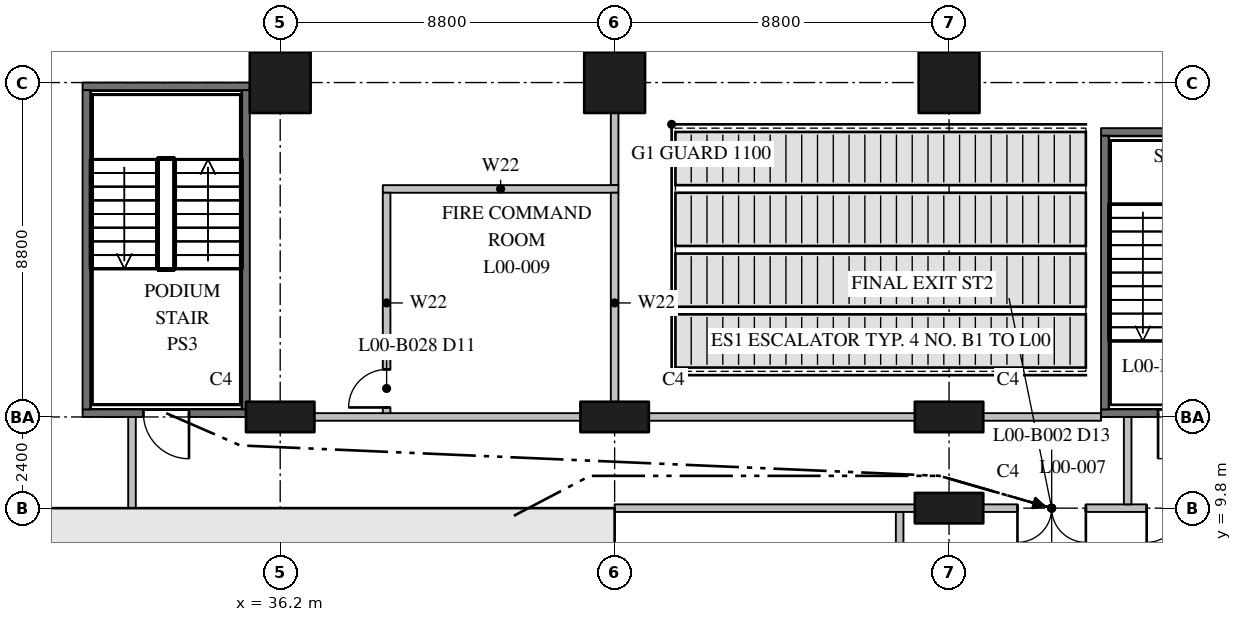
"""IFC4 building model, lengths in metres.
Left out: names, types, materials, properties, quantities, classifications, styles, units other than length and angle.
Written with IfcOpenShell. Run it as: python <this file> out.ifc"""

import sys

from ifc_helpers import new_model, si_unit, direction, frame, frame_2d, origin, origin_2d, place, context, subcontext, project, spatial, rectangle, extrude, element, fill, save


model = new_model("IFC4")
c1 = context("Model", 3, precision=1e-05, world=origin(), true_north=direction((0.0, 1.0)))
c2 = subcontext(c1, "Body", "Model", "MODEL_VIEW")
j1 = project(units=[si_unit("LENGTHUNIT", "METRE"), si_unit("PLANEANGLEUNIT", "RADIAN")], contexts=[c1])
p1 = place(None, origin())
s1 = spatial("IfcSite", under=j1, at=p1, CompositionType="ELEMENT")
p2 = place(p1, origin())
s2 = spatial("IfcBuilding", under=s1, at=p2, CompositionType="ELEMENT")
p3 = place(p2, origin())
s3 = spatial("IfcBuildingStorey", under=s2, at=p3, CompositionType="ELEMENT", Elevation=0.0)
p4 = place(p3, frame((36.2, 12.2, 0.0), z_axis=(0.0, 0.0, 1.0), x_axis=(1.0, 0.0, 0.0)))
e1 = element("IfcColumn", 1, at=p4, inside=s3, PredefinedType="COLUMN", context=c2, shape_type="SweptSolid", body=[
    extrude(rectangle(XDim=1.8, YDim=0.8, at=origin_2d()), origin(), (0.0, 0.0, 1.0), 7.5),
])
p5 = place(p3, frame((36.2, 21.0, 0.0), z_axis=(0.0, 0.0, 1.0), x_axis=(1.0, 0.0, 0.0)))
e2 = element("IfcColumn", 2, at=p5, inside=s3, PredefinedType="COLUMN", context=c2, shape_type="SweptSolid", body=[
    extrude(rectangle(XDim=1.6, YDim=1.6, at=origin_2d()), origin(), (0.0, 0.0, 1.0), 7.5),
])
p6 = place(p3, frame((45.0, 12.2, 0.0), z_axis=(0.0, 0.0, 1.0), x_axis=(1.0, 0.0, 0.0)))
e3 = element("IfcColumn", 3, at=p6, inside=s3, PredefinedType="COLUMN", context=c2, shape_type="SweptSolid", body=[
    extrude(rectangle(XDim=1.8, YDim=0.8, at=origin_2d()), origin(), (0.0, 0.0, 1.0), 7.5),
])
p7 = place(p3, frame((45.0, 21.0, 0.0), z_axis=(0.0, 0.0, 1.0), x_axis=(1.0, 0.0, 0.0)))
e4 = element("IfcColumn", 4, at=p7, inside=s3, PredefinedType="COLUMN", context=c2, shape_type="SweptSolid", body=[
    extrude(rectangle(XDim=1.6, YDim=1.6, at=origin_2d()), origin(), (0.0, 0.0, 1.0), 7.5),
])
for number, where, z_axis, x_axis in (
    (5, (53.8, 9.8, 0.0), (0.0, 0.0, 1.0), (1.0, 0.0, 0.0)),
    (6, (53.8, 12.2, 0.0), (0.0, 0.0, 1.0), (1.0, 0.0, 0.0)),
):
    element("IfcColumn", number, at=place(p3, frame(where, z_axis=z_axis, x_axis=x_axis)), inside=s3, PredefinedType="COLUMN", context=c2, shape_type="SweptSolid", body=[
        extrude(rectangle(XDim=1.8, YDim=0.8, at=origin_2d()), origin(), (0.0, 0.0, 1.0), 7.5),
    ])
p8 = place(p3, frame((53.8, 21.0, 0.0), z_axis=(0.0, 0.0, 1.0), x_axis=(1.0, 0.0, 0.0)))
e7 = element("IfcColumn", 7, at=p8, inside=s3, PredefinedType="COLUMN", context=c2, shape_type="SweptSolid", body=[
    extrude(rectangle(XDim=1.6, YDim=1.6, at=origin_2d()), origin(), (0.0, 0.0, 1.0), 7.5),
])
p9 = place(p3, frame((44.4, 1.2, 0.0), z_axis=(0.0, 0.0, 1.0), x_axis=(0.0, 1.0, 0.0)))
e8 = element("IfcWall", 8, at=p9, inside=s3, PredefinedType="SHEAR", context=c2, shape_type="SweptSolid", body=[
    extrude(rectangle(XDim=8.6, YDim=1.2, at=frame_2d((4.3, 0.0))), origin(), (0.0, 0.0, 1.0), 7.5),
])
p10 = place(p9, frame((5.4, 0.0, 0.0)))
e9 = element("IfcOpeningElement", 9, at=p10, cuts=e8, PredefinedType="OPENING", context=c2, shape_type="SweptSolid", body=[
    extrude(rectangle(XDim=1.2, YDim=2.1, at=frame_2d((0.6, 1.05))), frame((0.0, 0.61, 0.0), z_axis=(0.0, -1.0, 0.0), x_axis=(1.0, 0.0, 0.0)), (0.0, 0.0, 1.0), 1.22),
])
p11 = place(p3, frame((40.7, 9.6, 0.0), z_axis=(0.0, 0.0, 1.0), x_axis=(1.0, 0.0, 0.0)))
e10 = element("IfcWall", 10, at=p11, inside=s3, PredefinedType="SHEAR", context=c2, shape_type="SweptSolid", body=[
    extrude(rectangle(XDim=4.3, YDim=0.4, at=frame_2d((2.15, 0.0))), origin(), (0.0, 0.0, 1.0), 7.5),
])
p12 = place(p11, frame((1.05, 0.0, 0.0)))
e11 = element("IfcOpeningElement", 11, at=p12, cuts=e10, PredefinedType="OPENING", context=c2, shape_type="SweptSolid", body=[
    extrude(rectangle(XDim=1.2, YDim=2.1, at=frame_2d((0.6, 1.05))), frame((0.0, 0.21, 0.0), z_axis=(0.0, -1.0, 0.0), x_axis=(1.0, 0.0, 0.0)), (0.0, 0.0, 1.0), 0.42),
])
p13 = place(p3, frame((27.1, 9.6, 0.0), z_axis=(0.0, 0.0, 1.0), x_axis=(1.0, 0.0, 0.0)))
e12 = element("IfcWall", 12, at=p13, inside=s3, PredefinedType="SHEAR", context=c2, shape_type="SweptSolid", body=[
    extrude(rectangle(XDim=13.6, YDim=0.4, at=frame_2d((6.8, 0.0))), origin(), (0.0, 0.0, 1.0), 7.5),
])
p14 = place(p13, frame((0.85, 0.0, 0.0)))
e13 = element("IfcOpeningElement", 13, at=p14, cuts=e12, PredefinedType="OPENING", context=c2, shape_type="SweptSolid", body=[
    extrude(rectangle(XDim=0.9, YDim=2.1, at=frame_2d((0.45, 1.05))), frame((0.0, 0.21, 0.0), z_axis=(0.0, -1.0, 0.0), x_axis=(1.0, 0.0, 0.0)), (0.0, 0.0, 1.0), 0.42),
])
p15 = place(p13, frame((3.4, 0.0, 0.0)))
e14 = element("IfcOpeningElement", 14, at=p15, cuts=e12, PredefinedType="OPENING", context=c2, shape_type="SweptSolid", body=[
    extrude(rectangle(XDim=1.0, YDim=2.1, at=frame_2d((0.5, 1.05))), frame((0.0, 0.21, 0.0), z_axis=(0.0, -1.0, 0.0), x_axis=(1.0, 0.0, 0.0)), (0.0, 0.0, 1.0), 0.42),
])
p16 = place(p3, frame((40.7, 1.2, 0.0), z_axis=(0.0, 0.0, 1.0), x_axis=(0.0, 1.0, 0.0)))
e15 = element("IfcWall", 15, at=p16, inside=s3, PredefinedType="SHEAR", context=c2, shape_type="SweptSolid", body=[
    extrude(rectangle(XDim=8.4, YDim=0.4, at=frame_2d((4.2, 0.0))), origin(), (0.0, 0.0, 1.0), 7.5),
])
p17 = place(p16, frame((4.45, 0.0, 0.0)))
e16 = element("IfcOpeningElement", 16, at=p17, cuts=e15, PredefinedType="OPENING", context=c2, shape_type="SweptSolid", body=[
    extrude(rectangle(XDim=0.9, YDim=2.1, at=frame_2d((0.45, 1.05))), frame((0.0, 0.21, 0.0), z_axis=(0.0, -1.0, 0.0), x_axis=(1.0, 0.0, 0.0)), (0.0, 0.0, 1.0), 0.42),
])
p18 = place(p3, frame((37.5, 7.0, 0.0), z_axis=(0.0, 0.0, 1.0), x_axis=(0.0, 1.0, 0.0)))
e17 = element("IfcWall", 17, at=p18, inside=s3, PredefinedType="SHEAR", context=c2, shape_type="SweptSolid", body=[
    extrude(rectangle(XDim=2.4, YDim=0.25, at=frame_2d((1.2, 0.0))), origin(), (0.0, 0.0, 1.0), 7.5),
])
p19 = place(p3, frame((57.8, 12.3, 0.0), z_axis=(0.0, 0.0, 1.0), x_axis=(1.0, 0.0, 0.0)))
e18 = element("IfcWall", 18, at=p19, inside=s3, PredefinedType="SHEAR", context=c2, shape_type="SweptSolid", body=[
    extrude(rectangle(XDim=4.2, YDim=0.2, at=frame_2d((2.1, 0.0))), origin(), (0.0, 0.0, 1.0), 7.1),
])
p20 = place(p19, frame((1.5, 0.0, 0.0)))
e19 = element("IfcOpeningElement", 19, at=p20, cuts=e18, PredefinedType="OPENING", context=c2, shape_type="SweptSolid", body=[
    extrude(rectangle(XDim=1.2, YDim=2.1, at=frame_2d((0.6, 1.05))), frame((0.0, 0.11, 0.0), z_axis=(0.0, -1.0, 0.0), x_axis=(1.0, 0.0, 0.0)), (0.0, 0.0, 1.0), 0.22),
])
p21 = place(p3, frame((57.8, 19.7, 0.0), z_axis=(0.0, 0.0, 1.0), x_axis=(1.0, 0.0, 0.0)))
e20 = element("IfcWall", 20, at=p21, inside=s3, PredefinedType="SHEAR", context=c2, shape_type="SweptSolid", body=[
    extrude(rectangle(XDim=4.2, YDim=0.2, at=frame_2d((2.1, 0.0))), origin(), (0.0, 0.0, 1.0), 7.1),
])
p22 = place(p3, frame((57.9, 12.4, 0.0), z_axis=(0.0, 0.0, 1.0), x_axis=(0.0, 1.0, 0.0)))
e21 = element("IfcWall", 21, at=p22, inside=s3, PredefinedType="SHEAR", context=c2, shape_type="SweptSolid", body=[
    extrude(rectangle(XDim=7.2, YDim=0.2, at=frame_2d((3.6, 0.0))), origin(), (0.0, 0.0, 1.0), 7.1),
])
p23 = place(p3, frame((31.0, 12.3, 0.0), z_axis=(0.0, 0.0, 1.0), x_axis=(1.0, 0.0, 0.0)))
e22 = element("IfcWall", 22, at=p23, inside=s3, PredefinedType="SHEAR", context=c2, shape_type="SweptSolid", body=[
    extrude(rectangle(XDim=4.4, YDim=0.2, at=frame_2d((2.2, 0.0))), origin(), (0.0, 0.0, 1.0), 7.1),
])
p24 = place(p23, frame((1.6, 0.0, 0.0)))
e23 = element("IfcOpeningElement", 23, at=p24, cuts=e22, PredefinedType="OPENING", context=c2, shape_type="SweptSolid", body=[
    extrude(rectangle(XDim=1.2, YDim=2.1, at=frame_2d((0.6, 1.05))), frame((0.0, 0.11, 0.0), z_axis=(0.0, -1.0, 0.0), x_axis=(1.0, 0.0, 0.0)), (0.0, 0.0, 1.0), 0.22),
])
p25 = place(p3, frame((31.0, 20.9, 0.0), z_axis=(0.0, 0.0, 1.0), x_axis=(1.0, 0.0, 0.0)))
e24 = element("IfcWall", 24, at=p25, inside=s3, PredefinedType="SHEAR", context=c2, shape_type="SweptSolid", body=[
    extrude(rectangle(XDim=4.4, YDim=0.2, at=frame_2d((2.2, 0.0))), origin(), (0.0, 0.0, 1.0), 7.1),
])
for number, where, z_axis, x_axis in (
    (25, (31.1, 12.4, 0.0), (0.0, 0.0, 1.0), (0.0, 1.0, 0.0)),
    (26, (35.3, 12.4, 0.0), (0.0, 0.0, 1.0), (0.0, 1.0, 0.0)),
):
    element("IfcWall", number, at=place(p3, frame(where, z_axis=z_axis, x_axis=x_axis)), inside=s3, PredefinedType="SHEAR", context=c2, shape_type="SweptSolid", body=[
        extrude(rectangle(XDim=8.4, YDim=0.2, at=frame_2d((4.2, 0.0))), origin(), (0.0, 0.0, 1.0), 7.1),
    ])
p26 = place(p3, frame((45.0, 9.8, 0.0), z_axis=(0.0, 0.0, 1.0), x_axis=(1.0, 0.0, 0.0)))
e27 = element("IfcWall", 27, at=p26, inside=s3, PredefinedType="PARTITIONING", context=c2, shape_type="SweptSolid", body=[
    extrude(rectangle(XDim=19.4, YDim=0.2, at=frame_2d((9.7, 0.0))), origin(), (0.0, 0.0, 1.0), 7.1),
])
p27 = place(p26, frame((10.6, 0.0, 0.0)))
e28 = element("IfcOpeningElement", 28, at=p27, cuts=e27, PredefinedType="OPENING", context=c2, shape_type="SweptSolid", body=[
    extrude(rectangle(XDim=1.8, YDim=2.1, at=frame_2d((0.9, 1.05))), frame((0.0, 0.11, 0.0), z_axis=(0.0, -1.0, 0.0), x_axis=(1.0, 0.0, 0.0)), (0.0, 0.0, 1.0), 0.22),
])
p28 = place(p26, frame((14.0, 0.0, 0.0)))
e29 = element("IfcOpeningElement", 29, at=p28, cuts=e27, PredefinedType="OPENING", context=c2, shape_type="SweptSolid", body=[
    extrude(rectangle(XDim=1.8, YDim=2.1, at=frame_2d((0.9, 1.05))), frame((0.0, 0.11, 0.0), z_axis=(0.0, -1.0, 0.0), x_axis=(1.0, 0.0, 0.0)), (0.0, 0.0, 1.0), 0.22),
])
p29 = place(p3, frame((35.4, 12.2, 0.0), z_axis=(0.0, 0.0, 1.0), x_axis=(1.0, 0.0, 0.0)))
e30 = element("IfcWall", 30, at=p29, inside=s3, PredefinedType="PARTITIONING", context=c2, shape_type="SweptSolid", body=[
    extrude(rectangle(XDim=22.4, YDim=0.2, at=frame_2d((11.2, 0.0))), origin(), (0.0, 0.0, 1.0), 7.1),
])
p30 = place(p3, frame((38.9, 18.2, 0.0), z_axis=(0.0, 0.0, 1.0), x_axis=(1.0, 0.0, 0.0)))
e31 = element("IfcWall", 31, at=p30, inside=s3, PredefinedType="PARTITIONING", context=c2, shape_type="SweptSolid", body=[
    extrude(rectangle(XDim=6.2, YDim=0.2, at=frame_2d((3.1, 0.0))), origin(), (0.0, 0.0, 1.0), 7.1),
])
p31 = place(p3, frame((58.5, 9.9, 0.0), z_axis=(0.0, 0.0, 1.0), x_axis=(0.0, 1.0, 0.0)))
e32 = element("IfcWall", 32, at=p31, inside=s3, PredefinedType="PARTITIONING", context=c2, shape_type="SweptSolid", body=[
    extrude(rectangle(XDim=2.3, YDim=0.2, at=frame_2d((1.15, 0.0))), origin(), (0.0, 0.0, 1.0), 7.1),
])
p32 = place(p3, frame((32.3, 9.8, 0.0), z_axis=(0.0, 0.0, 1.0), x_axis=(0.0, 1.0, 0.0)))
e33 = element("IfcWall", 33, at=p32, inside=s3, PredefinedType="PARTITIONING", context=c2, shape_type="SweptSolid", body=[
    extrude(rectangle(XDim=2.4, YDim=0.2, at=frame_2d((1.2, 0.0))), origin(), (0.0, 0.0, 1.0), 7.1),
])
p33 = place(p3, frame((39.0, 12.3, 0.0), z_axis=(0.0, 0.0, 1.0), x_axis=(0.0, 1.0, 0.0)))
e34 = element("IfcWall", 34, at=p33, inside=s3, PredefinedType="PARTITIONING", context=c2, shape_type="SweptSolid", body=[
    extrude(rectangle(XDim=5.8, YDim=0.2, at=frame_2d((2.9, 0.0))), origin(), (0.0, 0.0, 1.0), 7.1),
])
p34 = place(p33, frame((0.15, 0.0, 0.0)))
e35 = element("IfcOpeningElement", 35, at=p34, cuts=e34, PredefinedType="OPENING", context=c2, shape_type="SweptSolid", body=[
    extrude(rectangle(XDim=1.0, YDim=2.1, at=frame_2d((0.5, 1.05))), frame((0.0, 0.11, 0.0), z_axis=(0.0, -1.0, 0.0), x_axis=(1.0, 0.0, 0.0)), (0.0, 0.0, 1.0), 0.22),
])
p35 = place(p3, frame((45.0, 12.3, 0.0), z_axis=(0.0, 0.0, 1.0), x_axis=(0.0, 1.0, 0.0)))
e36 = element("IfcWall", 36, at=p35, inside=s3, PredefinedType="PARTITIONING", context=c2, shape_type="SweptSolid", body=[
    extrude(rectangle(XDim=5.8, YDim=0.2, at=frame_2d((2.9, 0.0))), origin(), (0.0, 0.0, 1.0), 7.1),
])
p36 = place(p3, frame((45.0, 18.3, 0.0), z_axis=(0.0, 0.0, 1.0), x_axis=(0.0, 1.0, 0.0)))
e37 = element("IfcWall", 37, at=p36, inside=s3, PredefinedType="PARTITIONING", context=c2, shape_type="SweptSolid", body=[
    extrude(rectangle(XDim=8.4, YDim=0.2, at=frame_2d((4.2, 0.0))), origin(), (0.0, 0.0, 1.0), 7.1),
])
p37 = place(p36, frame((4.4, 0.0, 0.0)))
e38 = element("IfcOpeningElement", 38, at=p37, cuts=e37, PredefinedType="OPENING", context=c2, shape_type="SweptSolid", body=[
    extrude(rectangle(XDim=2.4, YDim=2.4, at=frame_2d((1.2, 1.2))), frame((0.0, 0.11, 0.0), z_axis=(0.0, -1.0, 0.0), x_axis=(1.0, 0.0, 0.0)), (0.0, 0.0, 1.0), 0.22),
])
p38 = place(p3, frame((52.5, 0.2, 0.0), z_axis=(0.0, 0.0, 1.0), x_axis=(0.0, 1.0, 0.0)))
e39 = element("IfcWall", 39, at=p38, inside=s3, PredefinedType="PARTITIONING", context=c2, shape_type="SweptSolid", body=[
    extrude(rectangle(XDim=9.5, YDim=0.2, at=frame_2d((4.75, 0.0))), origin(), (0.0, 0.0, 1.0), 7.1),
])
p39 = place(p38, frame((4.2, 0.0, 0.0)))
e40 = element("IfcOpeningElement", 40, at=p39, cuts=e39, PredefinedType="OPENING", context=c2, shape_type="SweptSolid", body=[
    extrude(rectangle(XDim=1.0, YDim=2.1, at=frame_2d((0.5, 1.05))), frame((0.0, 0.11, 0.0), z_axis=(0.0, -1.0, 0.0), x_axis=(1.0, 0.0, 0.0)), (0.0, 0.0, 1.0), 0.22),
])
p40 = place(p15, frame((1.0, 0.0, 0.0), z_axis=(0.0, 0.0, 1.0), x_axis=(-1.0, 0.0, 0.0)))
e41 = element("IfcDoor", 41, at=p40, inside=s3, OperationType="SINGLE_SWING_RIGHT", PredefinedType="DOOR", context=c2, shape_type="SweptSolid", body=[
    extrude(rectangle(XDim=1.0, YDim=2.1, at=frame_2d((0.5, 1.05))), frame((0.0, 0.025, 0.0), z_axis=(0.0, -1.0, 0.0), x_axis=(1.0, 0.0, 0.0)), (0.0, 0.0, 1.0), 0.05),
])
fill(e14, e41)
p41 = place(p12, origin())
e42 = element("IfcDoor", 42, at=p41, inside=s3, OperationType="SINGLE_SWING_LEFT", PredefinedType="DOOR", context=c2, shape_type="SweptSolid", body=[
    extrude(rectangle(XDim=1.2, YDim=2.1, at=frame_2d((0.6, 1.05))), frame((0.0, 0.025, 0.0), z_axis=(0.0, -1.0, 0.0), x_axis=(1.0, 0.0, 0.0)), (0.0, 0.0, 1.0), 0.05),
])
fill(e11, e42)
p42 = place(p20, frame((1.2, 0.0, 0.0), z_axis=(0.0, 0.0, 1.0), x_axis=(-1.0, 0.0, 0.0)))
e43 = element("IfcDoor", 43, at=p42, inside=s3, OperationType="SINGLE_SWING_LEFT", PredefinedType="DOOR", context=c2, shape_type="SweptSolid", body=[
    extrude(rectangle(XDim=1.2, YDim=2.1, at=frame_2d((0.6, 1.05))), frame((0.0, 0.025, 0.0), z_axis=(0.0, -1.0, 0.0), x_axis=(1.0, 0.0, 0.0)), (0.0, 0.0, 1.0), 0.05),
])
fill(e19, e43)
p43 = place(p24, frame((1.2, 0.0, 0.0), z_axis=(0.0, 0.0, 1.0), x_axis=(-1.0, 0.0, 0.0)))
e44 = element("IfcDoor", 44, at=p43, inside=s3, OperationType="SINGLE_SWING_RIGHT", PredefinedType="DOOR", context=c2, shape_type="SweptSolid", body=[
    extrude(rectangle(XDim=1.2, YDim=2.1, at=frame_2d((0.6, 1.05))), frame((0.0, 0.025, 0.0), z_axis=(0.0, -1.0, 0.0), x_axis=(1.0, 0.0, 0.0)), (0.0, 0.0, 1.0), 0.05),
])
fill(e23, e44)
p44 = place(p27, frame((1.8, 0.0, 0.0), z_axis=(0.0, 0.0, 1.0), x_axis=(-1.0, 0.0, 0.0)))
e45 = element("IfcDoor", 45, at=p44, inside=s3, OperationType="DOUBLE_DOOR_SINGLE_SWING", PredefinedType="DOOR", context=c2, shape_type="SweptSolid", body=[
    extrude(rectangle(XDim=1.8, YDim=2.1, at=frame_2d((0.9, 1.05))), frame((0.0, 0.025, 0.0), z_axis=(0.0, -1.0, 0.0), x_axis=(1.0, 0.0, 0.0)), (0.0, 0.0, 1.0), 0.05),
])
fill(e28, e45)
p45 = place(p28, frame((1.8, 0.0, 0.0), z_axis=(0.0, 0.0, 1.0), x_axis=(-1.0, 0.0, 0.0)))
e46 = element("IfcDoor", 46, at=p45, inside=s3, OperationType="DOUBLE_DOOR_SINGLE_SWING", PredefinedType="DOOR", context=c2, shape_type="SweptSolid", body=[
    extrude(rectangle(XDim=1.8, YDim=2.1, at=frame_2d((0.9, 1.05))), frame((0.0, 0.025, 0.0), z_axis=(0.0, -1.0, 0.0), x_axis=(1.0, 0.0, 0.0)), (0.0, 0.0, 1.0), 0.05),
])
fill(e29, e46)
p46 = place(p34, origin())
e47 = element("IfcDoor", 47, at=p46, inside=s3, OperationType="SINGLE_SWING_LEFT", PredefinedType="DOOR", context=c2, shape_type="SweptSolid", body=[
    extrude(rectangle(XDim=1.0, YDim=2.1, at=frame_2d((0.5, 1.05))), frame((0.0, 0.025, 0.0), z_axis=(0.0, -1.0, 0.0), x_axis=(1.0, 0.0, 0.0)), (0.0, 0.0, 1.0), 0.05),
])
fill(e35, e47)
save(model, sys.argv[1])
